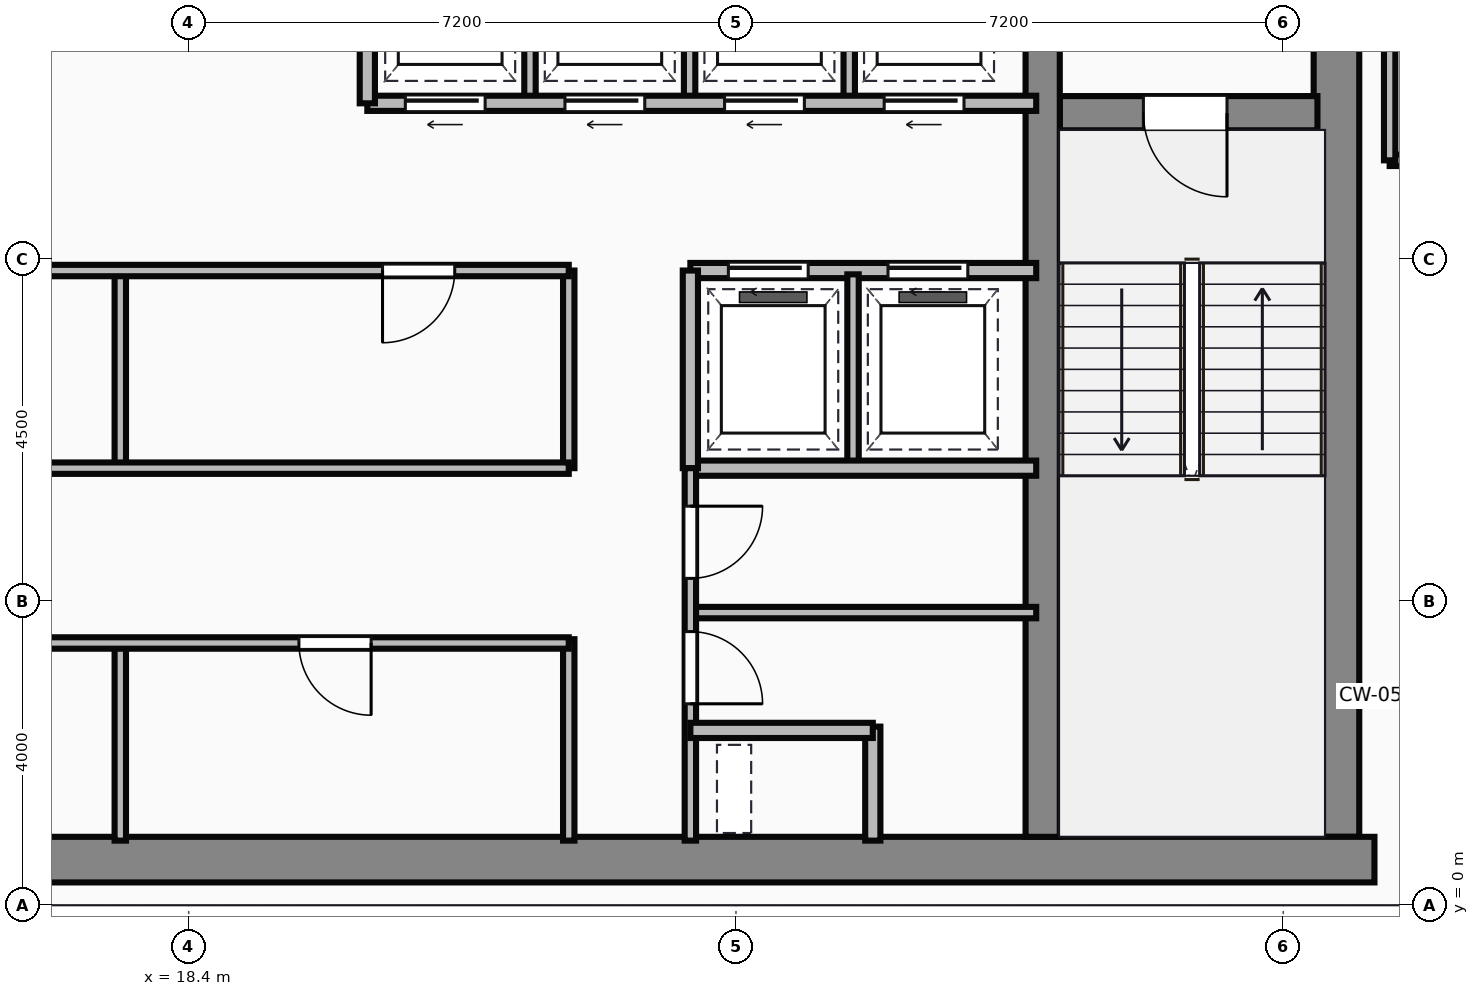
"""IFC4 building model, lengths in metres.
Left out: names, types, materials, properties, quantities, classifications, styles, units other than length and angle.
Written with IfcOpenShell. Run it as: python <this file> out.ifc"""

import sys

from ifc_helpers import new_model, si_unit, direction, frame, frame_2d, origin, place, context, subcontext, project, spatial, rectangle, extrude, source, transform, mapped, element, fill, save


model = new_model("IFC4")
c1 = context("Model", 3, precision=1e-05, world=origin(), true_north=direction((0.0, 1.0)))
c2 = subcontext(c1, "Body", "Model", "MODEL_VIEW")
j1 = project(units=[si_unit("LENGTHUNIT", "METRE"), si_unit("PLANEANGLEUNIT", "RADIAN")], contexts=[c1])
p1 = place(None, origin())
s1 = spatial("IfcSite", under=j1, at=p1, CompositionType="ELEMENT")
p2 = place(p1, origin())
s2 = spatial("IfcBuilding", under=s1, at=p2, CompositionType="ELEMENT")
p3 = place(p2, frame((0.0, 0.0, 280.7)))
s3 = spatial("IfcBuildingStorey", under=s2, at=p3, CompositionType="ELEMENT", Elevation=280.7)
m1 = source(origin(), c2, "Body", "SweptSolid", [
    extrude(rectangle(XDim=29.5, YDim=0.6, at=frame_2d((14.75, 0.0))), origin(), (0.0, 0.0, 1.0), 3.65),
])
p4 = place(p3, frame((4.5, 0.6, 0.0), z_axis=(0.0, 0.0, 1.0), x_axis=(1.0, 0.0, 0.0)))
e1 = element("IfcWall", 1, at=p4, inside=s3, PredefinedType="SHEAR", context=c2, shape_type="MappedRepresentation", body=[
    mapped(m1, transform((0.0, 0.0, 0.0))),
])
m2 = source(origin(), c2, "Body", "SweptSolid", [
    extrude(rectangle(XDim=13.1, YDim=0.6, at=frame_2d((6.55, 0.0))), origin(), (0.0, 0.0, 1.0), 3.65),
])
p5 = place(p3, frame((33.5, 0.9, 0.0), z_axis=(0.0, 0.0, 1.0), x_axis=(0.0, 1.0, 0.0)))
e2 = element("IfcWall", 2, at=p5, inside=s3, PredefinedType="SHEAR", context=c2, shape_type="MappedRepresentation", body=[
    mapped(m2, transform((0.0, 0.0, 0.0))),
])
m3 = source(origin(), c2, "Body", "SweptSolid", [
    extrude(rectangle(XDim=12.5, YDim=0.45, at=frame_2d((6.25, 0.0))), origin(), (0.0, 0.0, 1.0), 3.65),
])
p6 = place(p3, frame((29.635, 0.9, 0.0), z_axis=(0.0, 0.0, 1.0), x_axis=(0.0, 1.0, 0.0)))
e3 = element("IfcWall", 3, at=p6, inside=s3, PredefinedType="SHEAR", context=c2, shape_type="MappedRepresentation", body=[
    mapped(m3, transform((0.0, 0.0, 0.0))),
])
m4 = source(origin(), c2, "Body", "SweptSolid", [
    extrude(rectangle(XDim=3.39, YDim=0.45, at=frame_2d((1.695, 0.0))), origin(), (0.0, 0.0, 1.0), 3.65),
])
p7 = place(p3, frame((29.86, 10.42, 0.0), z_axis=(0.0, 0.0, 1.0), x_axis=(1.0, 0.0, 0.0)))
e4 = element("IfcWall", 4, at=p7, inside=s3, PredefinedType="SHEAR", context=c2, shape_type="MappedRepresentation", body=[
    mapped(m4, transform((0.0, 0.0, 0.0))),
])
p8 = place(p7, frame((1.1, 0.0, 0.0)))
e5 = element("IfcOpeningElement", 5, at=p8, cuts=e4, PredefinedType="OPENING", context=c2, shape_type="SweptSolid", body=[
    extrude(rectangle(XDim=1.1, YDim=2.15, at=frame_2d((0.55, 1.075))), frame((0.0, 0.235, 0.0), z_axis=(0.0, -1.0, 0.0), x_axis=(1.0, 0.0, 0.0)), (0.0, 0.0, 1.0), 0.47),
])
m5 = source(origin(), c2, "Body", "SweptSolid", [
    extrude(rectangle(XDim=10.35, YDim=0.15, at=frame_2d((5.175, 0.0))), origin(), (0.0, 0.0, 1.0), 3.4),
])
p9 = place(p3, frame((13.05, 3.45, 0.0), z_axis=(0.0, 0.0, 1.0), x_axis=(1.0, 0.0, 0.0)))
e6 = element("IfcWall", 6, at=p9, inside=s3, PredefinedType="PARTITIONING", context=c2, shape_type="MappedRepresentation", body=[
    mapped(m5, transform((0.0, 0.0, 0.0))),
])
p10 = place(p9, frame((2.1, 0.0, 0.0)))
e7 = element("IfcOpeningElement", 7, at=p10, cuts=e6, PredefinedType="OPENING", context=c2, shape_type="SweptSolid", body=[
    extrude(rectangle(XDim=0.95, YDim=2.15, at=frame_2d((0.475, 1.075))), frame((0.0, 0.085, 0.0), z_axis=(0.0, -1.0, 0.0), x_axis=(1.0, 0.0, 0.0)), (0.0, 0.0, 1.0), 0.17),
])
p11 = place(p9, frame((6.8, 0.0, 0.0)))
e8 = element("IfcOpeningElement", 8, at=p11, cuts=e6, PredefinedType="OPENING", context=c2, shape_type="SweptSolid", body=[
    extrude(rectangle(XDim=0.95, YDim=2.15, at=frame_2d((0.475, 1.075))), frame((0.0, 0.085, 0.0), z_axis=(0.0, -1.0, 0.0), x_axis=(1.0, 0.0, 0.0)), (0.0, 0.0, 1.0), 0.17),
])
m6 = source(origin(), c2, "Body", "SweptSolid", [
    extrude(rectangle(XDim=2.65, YDim=0.15, at=frame_2d((1.325, 0.0))), origin(), (0.0, 0.0, 1.0), 3.4),
])
p12 = place(p3, frame((23.4, 0.85, 0.0), z_axis=(0.0, 0.0, 1.0), x_axis=(0.0, 1.0, 0.0)))
e9 = element("IfcWall", 9, at=p12, inside=s3, PredefinedType="PARTITIONING", context=c2, shape_type="MappedRepresentation", body=[
    mapped(m6, transform((0.0, 0.0, 0.0))),
])
m7 = source(origin(), c2, "Body", "SweptSolid", [
    extrude(rectangle(XDim=2.6, YDim=0.15, at=frame_2d((1.3, 0.0))), origin(), (0.0, 0.0, 1.0), 3.4),
])
p13 = place(p3, frame((17.5, 0.85, 0.0), z_axis=(0.0, 0.0, 1.0), x_axis=(0.0, 1.0, 0.0)))
e10 = element("IfcWall", 10, at=p13, inside=s3, PredefinedType="PARTITIONING", context=c2, shape_type="MappedRepresentation", body=[
    mapped(m7, transform((0.0, 0.0, 0.0))),
])
m8 = source(origin(), c2, "Body", "SweptSolid", [
    extrude(rectangle(XDim=11.85, YDim=0.15, at=frame_2d((5.925, 0.0))), origin(), (0.0, 0.0, 1.0), 3.4),
])
p14 = place(p3, frame((11.55, 5.75, 0.0), z_axis=(0.0, 0.0, 1.0), x_axis=(1.0, 0.0, 0.0)))
e11 = element("IfcWall", 11, at=p14, inside=s3, PredefinedType="PARTITIONING", context=c2, shape_type="MappedRepresentation", body=[
    mapped(m8, transform((0.0, 0.0, 0.0))),
])
p15 = place(p3, frame((11.55, 8.35, 0.0), z_axis=(0.0, 0.0, 1.0), x_axis=(1.0, 0.0, 0.0)))
e12 = element("IfcWall", 12, at=p15, inside=s3, PredefinedType="PARTITIONING", context=c2, shape_type="MappedRepresentation", body=[
    mapped(m8, transform((0.0, 0.0, 0.0))),
])
p16 = place(p15, frame((1.1, 0.0, 0.0)))
e13 = element("IfcOpeningElement", 13, at=p16, cuts=e12, PredefinedType="OPENING", context=c2, shape_type="SweptSolid", body=[
    extrude(rectangle(XDim=0.95, YDim=2.15, at=frame_2d((0.475, 1.075))), frame((0.0, 0.085, 0.0), z_axis=(0.0, -1.0, 0.0), x_axis=(1.0, 0.0, 0.0)), (0.0, 0.0, 1.0), 0.17),
])
p17 = place(p15, frame((9.4, 0.0, 0.0)))
e14 = element("IfcOpeningElement", 14, at=p17, cuts=e12, PredefinedType="OPENING", context=c2, shape_type="SweptSolid", body=[
    extrude(rectangle(XDim=0.95, YDim=2.15, at=frame_2d((0.475, 1.075))), frame((0.0, 0.085, 0.0), z_axis=(0.0, -1.0, 0.0), x_axis=(1.0, 0.0, 0.0)), (0.0, 0.0, 1.0), 0.17),
])
m9 = source(origin(), c2, "Body", "SweptSolid", [
    extrude(rectangle(XDim=2.6, YDim=0.15, at=frame_2d((1.3, 0.0))), origin(), (0.0, 0.0, 1.0), 3.4),
])
p18 = place(p3, frame((23.4, 5.75, 0.0), z_axis=(0.0, 0.0, 1.0), x_axis=(0.0, 1.0, 0.0)))
e15 = element("IfcWall", 15, at=p18, inside=s3, PredefinedType="PARTITIONING", context=c2, shape_type="MappedRepresentation", body=[
    mapped(m9, transform((0.0, 0.0, 0.0))),
])
m10 = source(origin(), c2, "Body", "SweptSolid", [
    extrude(rectangle(XDim=2.5, YDim=0.15, at=frame_2d((1.25, 0.0))), origin(), (0.0, 0.0, 1.0), 3.4),
])
p19 = place(p3, frame((17.5, 5.8, 0.0), z_axis=(0.0, 0.0, 1.0), x_axis=(0.0, 1.0, 0.0)))
e16 = element("IfcWall", 16, at=p19, inside=s3, PredefinedType="PARTITIONING", context=c2, shape_type="MappedRepresentation", body=[
    mapped(m10, transform((0.0, 0.0, 0.0))),
])
m11 = source(origin(), c2, "Body", "SweptSolid", [
    extrude(rectangle(XDim=8.8, YDim=0.2, at=frame_2d((4.4, 0.0))), origin(), (0.0, 0.0, 1.0), 3.4),
])
p20 = place(p3, frame((20.75, 10.55, 0.0), z_axis=(0.0, 0.0, 1.0), x_axis=(1.0, 0.0, 0.0)))
e17 = element("IfcWall", 17, at=p20, inside=s3, PredefinedType="PARTITIONING", context=c2, shape_type="MappedRepresentation", body=[
    mapped(m11, transform((0.0, 0.0, 0.0))),
])
p21 = place(p20, frame((0.5, 0.0, 0.0)))
e18 = element("IfcOpeningElement", 18, at=p21, cuts=e17, PredefinedType="OPENING", context=c2, shape_type="SweptSolid", body=[
    extrude(rectangle(XDim=1.05, YDim=2.15, at=frame_2d((0.525, 1.075))), frame((0.0, 0.11, 0.0), z_axis=(0.0, -1.0, 0.0), x_axis=(1.0, 0.0, 0.0)), (0.0, 0.0, 1.0), 0.22),
])
p22 = place(p20, frame((2.6, 0.0, 0.0)))
e19 = element("IfcOpeningElement", 19, at=p22, cuts=e17, PredefinedType="OPENING", context=c2, shape_type="SweptSolid", body=[
    extrude(rectangle(XDim=1.05, YDim=2.15, at=frame_2d((0.525, 1.075))), frame((0.0, 0.11, 0.0), z_axis=(0.0, -1.0, 0.0), x_axis=(1.0, 0.0, 0.0)), (0.0, 0.0, 1.0), 0.22),
])
p23 = place(p20, frame((4.7, 0.0, 0.0)))
e20 = element("IfcOpeningElement", 20, at=p23, cuts=e17, PredefinedType="OPENING", context=c2, shape_type="SweptSolid", body=[
    extrude(rectangle(XDim=1.05, YDim=2.15, at=frame_2d((0.525, 1.075))), frame((0.0, 0.11, 0.0), z_axis=(0.0, -1.0, 0.0), x_axis=(1.0, 0.0, 0.0)), (0.0, 0.0, 1.0), 0.22),
])
p24 = place(p20, frame((6.8, 0.0, 0.0)))
e21 = element("IfcOpeningElement", 21, at=p24, cuts=e17, PredefinedType="OPENING", context=c2, shape_type="SweptSolid", body=[
    extrude(rectangle(XDim=1.05, YDim=2.15, at=frame_2d((0.525, 1.075))), frame((0.0, 0.11, 0.0), z_axis=(0.0, -1.0, 0.0), x_axis=(1.0, 0.0, 0.0)), (0.0, 0.0, 1.0), 0.22),
])
m12 = source(origin(), c2, "Body", "SweptSolid", [
    extrude(rectangle(XDim=3.0, YDim=0.2, at=frame_2d((1.5, 0.0))), origin(), (0.0, 0.0, 1.0), 3.4),
])
p25 = place(p3, frame((20.75, 10.55, 0.0), z_axis=(0.0, 0.0, 1.0), x_axis=(0.0, 1.0, 0.0)))
e22 = element("IfcWall", 22, at=p25, inside=s3, PredefinedType="PARTITIONING", context=c2, shape_type="MappedRepresentation", body=[
    mapped(m12, transform((0.0, 0.0, 0.0))),
])
m13 = source(origin(), c2, "Body", "SweptSolid", [
    extrude(rectangle(XDim=2.85, YDim=0.15, at=frame_2d((1.425, 0.0))), origin(), (0.0, 0.0, 1.0), 3.4),
])
for number, where, z_axis, x_axis in (
    (23, (22.89, 10.6, 0.0), (0.0, 0.0, 1.0), (0.0, 1.0, 0.0)),
    (24, (24.99, 10.6, 0.0), (0.0, 0.0, 1.0), (0.0, 1.0, 0.0)),
    (25, (27.09, 10.6, 0.0), (0.0, 0.0, 1.0), (0.0, 1.0, 0.0)),
):
    element("IfcWall", number, at=place(p3, frame(where, z_axis=z_axis, x_axis=x_axis)), inside=s3, PredefinedType="PARTITIONING", context=c2, shape_type="MappedRepresentation", body=[
        mapped(m13, transform((0.0, 0.0, 0.0))),
    ])
m14 = source(origin(), c2, "Body", "SweptSolid", [
    extrude(rectangle(XDim=4.55, YDim=0.2, at=frame_2d((2.275, 0.0))), origin(), (0.0, 0.0, 1.0), 3.4),
])
p26 = place(p3, frame((25.0, 8.35, 0.0), z_axis=(0.0, 0.0, 1.0), x_axis=(1.0, 0.0, 0.0)))
e26 = element("IfcWall", 26, at=p26, inside=s3, PredefinedType="PARTITIONING", context=c2, shape_type="MappedRepresentation", body=[
    mapped(m14, transform((0.0, 0.0, 0.0))),
])
p27 = place(p26, frame((0.5, 0.0, 0.0)))
e27 = element("IfcOpeningElement", 27, at=p27, cuts=e26, PredefinedType="OPENING", context=c2, shape_type="SweptSolid", body=[
    extrude(rectangle(XDim=1.05, YDim=2.15, at=frame_2d((0.525, 1.075))), frame((0.0, 0.11, 0.0), z_axis=(0.0, -1.0, 0.0), x_axis=(1.0, 0.0, 0.0)), (0.0, 0.0, 1.0), 0.22),
])
p28 = place(p26, frame((2.6, 0.0, 0.0)))
e28 = element("IfcOpeningElement", 28, at=p28, cuts=e26, PredefinedType="OPENING", context=c2, shape_type="SweptSolid", body=[
    extrude(rectangle(XDim=1.05, YDim=2.15, at=frame_2d((0.525, 1.075))), frame((0.0, 0.11, 0.0), z_axis=(0.0, -1.0, 0.0), x_axis=(1.0, 0.0, 0.0)), (0.0, 0.0, 1.0), 0.22),
])
p29 = place(p3, frame((25.0, 5.75, 0.0), z_axis=(0.0, 0.0, 1.0), x_axis=(1.0, 0.0, 0.0)))
e29 = element("IfcWall", 29, at=p29, inside=s3, PredefinedType="PARTITIONING", context=c2, shape_type="MappedRepresentation", body=[
    mapped(m14, transform((0.0, 0.0, 0.0))),
])
m15 = source(origin(), c2, "Body", "SweptSolid", [
    extrude(rectangle(XDim=2.6, YDim=0.2, at=frame_2d((1.3, 0.0))), origin(), (0.0, 0.0, 1.0), 3.4),
])
p30 = place(p3, frame((25.0, 5.75, 0.0), z_axis=(0.0, 0.0, 1.0), x_axis=(0.0, 1.0, 0.0)))
e30 = element("IfcWall", 30, at=p30, inside=s3, PredefinedType="PARTITIONING", context=c2, shape_type="MappedRepresentation", body=[
    mapped(m15, transform((0.0, 0.0, 0.0))),
])
p31 = place(p3, frame((27.14, 5.8, 0.0), z_axis=(0.0, 0.0, 1.0), x_axis=(0.0, 1.0, 0.0)))
e31 = element("IfcWall", 31, at=p31, inside=s3, PredefinedType="PARTITIONING", context=c2, shape_type="MappedRepresentation", body=[
    mapped(m10, transform((0.0, 0.0, 0.0))),
])
m16 = source(origin(), c2, "Body", "SweptSolid", [
    extrude(rectangle(XDim=4.9, YDim=0.15, at=frame_2d((2.45, 0.0))), origin(), (0.0, 0.0, 1.0), 3.4),
])
p32 = place(p3, frame((25.0, 0.85, 0.0), z_axis=(0.0, 0.0, 1.0), x_axis=(0.0, 1.0, 0.0)))
e32 = element("IfcWall", 32, at=p32, inside=s3, PredefinedType="PARTITIONING", context=c2, shape_type="MappedRepresentation", body=[
    mapped(m16, transform((0.0, 0.0, 0.0))),
])
p33 = place(p32, frame((1.8, 0.0, 0.0)))
e33 = element("IfcOpeningElement", 33, at=p33, cuts=e32, PredefinedType="OPENING", context=c2, shape_type="SweptSolid", body=[
    extrude(rectangle(XDim=0.95, YDim=2.15, at=frame_2d((0.475, 1.075))), frame((0.0, 0.085, 0.0), z_axis=(0.0, -1.0, 0.0), x_axis=(1.0, 0.0, 0.0)), (0.0, 0.0, 1.0), 0.17),
])
p34 = place(p32, frame((3.45, 0.0, 0.0)))
e34 = element("IfcOpeningElement", 34, at=p34, cuts=e32, PredefinedType="OPENING", context=c2, shape_type="SweptSolid", body=[
    extrude(rectangle(XDim=0.95, YDim=2.15, at=frame_2d((0.475, 1.075))), frame((0.0, 0.085, 0.0), z_axis=(0.0, -1.0, 0.0), x_axis=(1.0, 0.0, 0.0)), (0.0, 0.0, 1.0), 0.17),
])
m17 = source(origin(), c2, "Body", "SweptSolid", [
    extrude(rectangle(XDim=2.4, YDim=0.2, at=frame_2d((1.2, 0.0))), origin(), (0.0, 0.0, 1.0), 3.4),
])
p35 = place(p3, frame((25.0, 2.3, 0.0), z_axis=(0.0, 0.0, 1.0), x_axis=(1.0, 0.0, 0.0)))
e35 = element("IfcWall", 35, at=p35, inside=s3, PredefinedType="PARTITIONING", context=c2, shape_type="MappedRepresentation", body=[
    mapped(m17, transform((0.0, 0.0, 0.0))),
])
m18 = source(origin(), c2, "Body", "SweptSolid", [
    extrude(rectangle(XDim=1.5, YDim=0.2, at=frame_2d((0.75, 0.0))), origin(), (0.0, 0.0, 1.0), 3.4),
])
p36 = place(p3, frame((27.4, 0.85, 0.0), z_axis=(0.0, 0.0, 1.0), x_axis=(0.0, 1.0, 0.0)))
e36 = element("IfcWall", 36, at=p36, inside=s3, PredefinedType="PARTITIONING", context=c2, shape_type="MappedRepresentation", body=[
    mapped(m18, transform((0.0, 0.0, 0.0))),
])
m19 = source(origin(), c2, "Body", "SweptSolid", [
    extrude(rectangle(XDim=4.55, YDim=0.15, at=frame_2d((2.275, 0.0))), origin(), (0.0, 0.0, 1.0), 3.4),
])
p37 = place(p3, frame((25.0, 3.85, 0.0), z_axis=(0.0, 0.0, 1.0), x_axis=(1.0, 0.0, 0.0)))
e37 = element("IfcWall", 37, at=p37, inside=s3, PredefinedType="PARTITIONING", context=c2, shape_type="MappedRepresentation", body=[
    mapped(m19, transform((0.0, 0.0, 0.0))),
])
m20 = source(origin(), c2, "Body", "SweptSolid", [
    extrude(rectangle(XDim=4.8, YDim=0.15, at=frame_2d((2.4, 0.0))), origin(), (0.0, 0.0, 1.0), 3.4),
])
p38 = place(p3, frame((34.2, 9.8, 0.0), z_axis=(0.0, 0.0, 1.0), x_axis=(1.0, 0.0, 0.0)))
e38 = element("IfcWall", 38, at=p38, inside=s3, PredefinedType="PARTITIONING", context=c2, shape_type="MappedRepresentation", body=[
    mapped(m20, transform((0.0, 0.0, 0.0))),
])
m21 = source(origin(), c2, "Body", "SweptSolid", [
    extrude(rectangle(XDim=4.18, YDim=0.15, at=frame_2d((2.09, 0.0))), origin(), (0.0, 0.0, 1.0), 3.4),
])
p39 = place(p3, frame((34.2, 9.8, 0.0), z_axis=(0.0, 0.0, 1.0), x_axis=(0.0, 1.0, 0.0)))
e39 = element("IfcWall", 39, at=p39, inside=s3, PredefinedType="PARTITIONING", context=c2, shape_type="MappedRepresentation", body=[
    mapped(m21, transform((0.0, 0.0, 0.0))),
])
m22 = source(origin(), c2, "Body", "SweptSolid", [
    extrude(rectangle(XDim=1.1, YDim=2.15, at=frame_2d((0.55, 1.075))), frame((0.0, 0.025, 0.0), z_axis=(0.0, -1.0, 0.0), x_axis=(1.0, 0.0, 0.0)), (0.0, 0.0, 1.0), 0.05),
])
p40 = place(p8, frame((1.1, 0.0, 0.0), z_axis=(0.0, 0.0, 1.0), x_axis=(-1.0, 0.0, 0.0)))
e40 = element("IfcDoor", 40, at=p40, inside=s3, OperationType="SINGLE_SWING_RIGHT", PredefinedType="DOOR", context=c2, shape_type="MappedRepresentation", body=[
    mapped(m22, transform((0.0, 0.0, 0.0))),
])
fill(e5, e40)
m23 = source(origin(), c2, "Body", "SweptSolid", [
    extrude(rectangle(XDim=0.95, YDim=2.15, at=frame_2d((0.475, 1.075))), frame((0.0, 0.025, 0.0), z_axis=(0.0, -1.0, 0.0), x_axis=(1.0, 0.0, 0.0)), (0.0, 0.0, 1.0), 0.05),
])
p41 = place(p11, origin())
e41 = element("IfcDoor", 41, at=p41, inside=s3, OperationType="SINGLE_SWING_RIGHT", PredefinedType="DOOR", context=c2, shape_type="MappedRepresentation", body=[
    mapped(m23, transform((0.0, 0.0, 0.0))),
])
fill(e8, e41)
p42 = place(p17, origin())
e42 = element("IfcDoor", 42, at=p42, inside=s3, OperationType="SINGLE_SWING_LEFT", PredefinedType="DOOR", context=c2, shape_type="MappedRepresentation", body=[
    mapped(m23, transform((0.0, 0.0, 0.0))),
])
fill(e14, e42)
m24 = source(origin(), c2, "Body", "SweptSolid", [
    extrude(rectangle(XDim=1.05, YDim=2.15, at=frame_2d((0.525, 1.075))), frame((0.0, 0.025, 0.0), z_axis=(0.0, -1.0, 0.0), x_axis=(1.0, 0.0, 0.0)), (0.0, 0.0, 1.0), 0.05),
])
p43 = place(p21, frame((1.05, 0.0, 0.0), z_axis=(0.0, 0.0, 1.0), x_axis=(-1.0, 0.0, 0.0)))
e43 = element("IfcDoor", 43, at=p43, inside=s3, OperationType="SLIDING_TO_LEFT", PredefinedType="DOOR", context=c2, shape_type="MappedRepresentation", body=[
    mapped(m24, transform((0.0, 0.0, 0.0))),
])
fill(e18, e43)
p44 = place(p22, frame((1.05, 0.0, 0.0), z_axis=(0.0, 0.0, 1.0), x_axis=(-1.0, 0.0, 0.0)))
e44 = element("IfcDoor", 44, at=p44, inside=s3, OperationType="SLIDING_TO_LEFT", PredefinedType="DOOR", context=c2, shape_type="MappedRepresentation", body=[
    mapped(m24, transform((0.0, 0.0, 0.0))),
])
fill(e19, e44)
p45 = place(p23, frame((1.05, 0.0, 0.0), z_axis=(0.0, 0.0, 1.0), x_axis=(-1.0, 0.0, 0.0)))
e45 = element("IfcDoor", 45, at=p45, inside=s3, OperationType="SLIDING_TO_LEFT", PredefinedType="DOOR", context=c2, shape_type="MappedRepresentation", body=[
    mapped(m24, transform((0.0, 0.0, 0.0))),
])
fill(e20, e45)
p46 = place(p24, frame((1.05, 0.0, 0.0), z_axis=(0.0, 0.0, 1.0), x_axis=(-1.0, 0.0, 0.0)))
e46 = element("IfcDoor", 46, at=p46, inside=s3, OperationType="SLIDING_TO_LEFT", PredefinedType="DOOR", context=c2, shape_type="MappedRepresentation", body=[
    mapped(m24, transform((0.0, 0.0, 0.0))),
])
fill(e21, e46)
p47 = place(p27, origin())
e47 = element("IfcDoor", 47, at=p47, inside=s3, OperationType="SLIDING_TO_LEFT", PredefinedType="DOOR", context=c2, shape_type="MappedRepresentation", body=[
    mapped(m24, transform((0.0, 0.0, 0.0))),
])
fill(e27, e47)
p48 = place(p28, origin())
e48 = element("IfcDoor", 48, at=p48, inside=s3, OperationType="SLIDING_TO_LEFT", PredefinedType="DOOR", context=c2, shape_type="MappedRepresentation", body=[
    mapped(m24, transform((0.0, 0.0, 0.0))),
])
fill(e28, e48)
p49 = place(p33, origin())
e49 = element("IfcDoor", 49, at=p49, inside=s3, OperationType="SINGLE_SWING_LEFT", PredefinedType="DOOR", context=c2, shape_type="MappedRepresentation", body=[
    mapped(m23, transform((0.0, 0.0, 0.0))),
])
fill(e33, e49)
p50 = place(p34, origin())
e50 = element("IfcDoor", 50, at=p50, inside=s3, OperationType="SINGLE_SWING_RIGHT", PredefinedType="DOOR", context=c2, shape_type="MappedRepresentation", body=[
    mapped(m23, transform((0.0, 0.0, 0.0))),
])
fill(e34, e50)
save(model, sys.argv[1])
